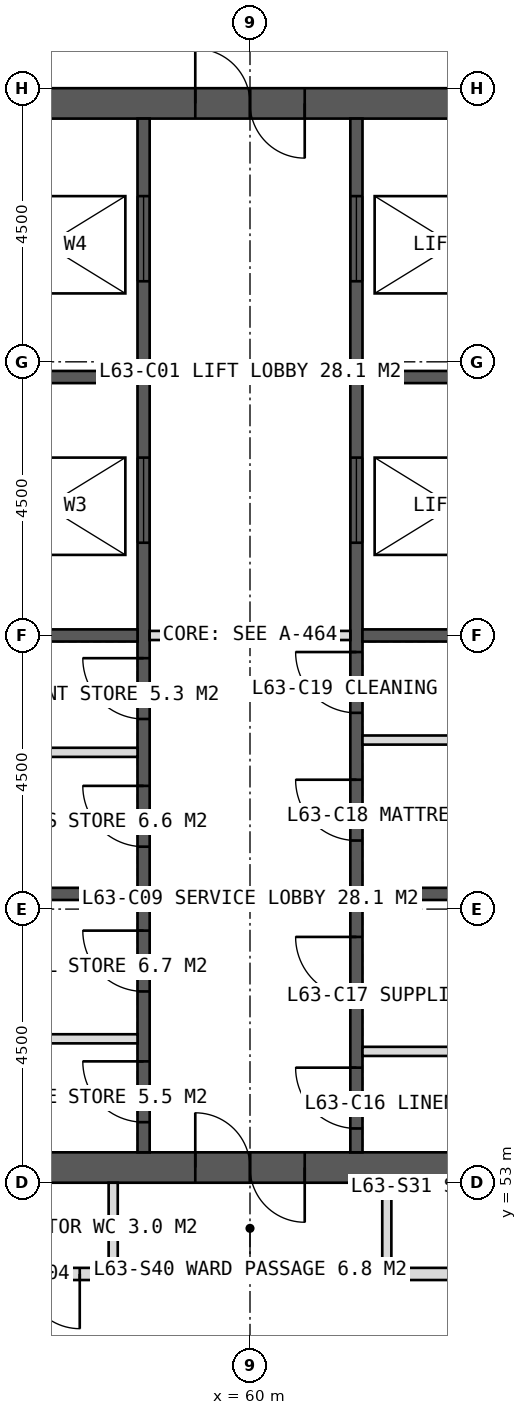
"""IFC4 building model, lengths in metres.
Left out: names, types, materials, properties, quantities, classifications, styles, units other than length and angle.
Written with IfcOpenShell. Run it as: python <this file> out.ifc"""

import sys

from ifc_helpers import new_model, si_unit, direction, frame, frame_2d, origin, place, context, subcontext, project, spatial, rectangle, extrude, element, fill, save


model = new_model("IFC4")
c1 = context("Model", 3, precision=1e-05, world=origin(), true_north=direction((0.0, 1.0)))
c2 = subcontext(c1, "Body", "Model", "MODEL_VIEW")
j1 = project(units=[si_unit("LENGTHUNIT", "METRE"), si_unit("PLANEANGLEUNIT", "RADIAN")], contexts=[c1])
p1 = place(None, origin())
s1 = spatial("IfcSite", under=j1, at=p1, CompositionType="ELEMENT")
p2 = place(p1, origin())
s2 = spatial("IfcBuilding", under=s1, at=p2, CompositionType="ELEMENT")
p3 = place(p2, frame((0.0, 0.0, 262.0)))
s3 = spatial("IfcBuildingStorey", under=s2, at=p3, CompositionType="ELEMENT", Elevation=262.0)
p4 = place(p3, frame((51.0, 70.75, 0.0), z_axis=(0.0, 0.0, 1.0), x_axis=(1.0, 0.0, 0.0)))
e1 = element("IfcWall", 1, at=p4, inside=s3, PredefinedType="SHEAR", context=c2, shape_type="SweptSolid", body=[
    extrude(rectangle(XDim=18.0, YDim=0.5, at=frame_2d((9.0, 0.0))), origin(), (0.0, 0.0, 1.0), 4.0),
])
p5 = place(p4, frame((8.1, 0.0, 0.0)))
e2 = element("IfcOpeningElement", 2, at=p5, cuts=e1, PredefinedType="OPENING", context=c2, shape_type="SweptSolid", body=[
    extrude(rectangle(XDim=1.8, YDim=2.2, at=frame_2d((0.9, 1.1))), frame((0.0, 0.26, 0.0), z_axis=(0.0, -1.0, 0.0), x_axis=(1.0, 0.0, 0.0)), (0.0, 0.0, 1.0), 0.52),
])
p6 = place(p3, frame((51.0, 53.25, 0.0), z_axis=(0.0, 0.0, 1.0), x_axis=(1.0, 0.0, 0.0)))
e3 = element("IfcWall", 3, at=p6, inside=s3, PredefinedType="SHEAR", context=c2, shape_type="SweptSolid", body=[
    extrude(rectangle(XDim=18.0, YDim=0.5, at=frame_2d((9.0, 0.0))), origin(), (0.0, 0.0, 1.0), 4.0),
])
p7 = place(p6, frame((8.1, 0.0, 0.0)))
e4 = element("IfcOpeningElement", 4, at=p7, cuts=e3, PredefinedType="OPENING", context=c2, shape_type="SweptSolid", body=[
    extrude(rectangle(XDim=1.8, YDim=2.2, at=frame_2d((0.9, 1.1))), frame((0.0, 0.26, 0.0), z_axis=(0.0, -1.0, 0.0), x_axis=(1.0, 0.0, 0.0)), (0.0, 0.0, 1.0), 0.52),
])
p8 = place(p3, frame((58.25, 53.5, 0.0), z_axis=(0.0, 0.0, 1.0), x_axis=(0.0, 1.0, 0.0)))
e5 = element("IfcWall", 5, at=p8, inside=s3, PredefinedType="SHEAR", context=c2, shape_type="SweptSolid", body=[
    extrude(rectangle(XDim=17.0, YDim=0.2, at=frame_2d((8.5, 0.0))), origin(), (0.0, 0.0, 1.0), 4.0),
])
p9 = place(p8, frame((0.496, 0.0, 0.0)))
e6 = element("IfcOpeningElement", 6, at=p9, cuts=e5, PredefinedType="OPENING", context=c2, shape_type="SweptSolid", body=[
    extrude(rectangle(XDim=1.0, YDim=2.1, at=frame_2d((0.5, 1.05))), frame((0.0, 0.11, 0.0), z_axis=(0.0, -1.0, 0.0), x_axis=(1.0, 0.0, 0.0)), (0.0, 0.0, 1.0), 0.22),
])
p10 = place(p8, frame((2.646, 0.0, 0.0)))
e7 = element("IfcOpeningElement", 7, at=p10, cuts=e5, PredefinedType="OPENING", context=c2, shape_type="SweptSolid", body=[
    extrude(rectangle(XDim=1.0, YDim=2.1, at=frame_2d((0.5, 1.05))), frame((0.0, 0.11, 0.0), z_axis=(0.0, -1.0, 0.0), x_axis=(1.0, 0.0, 0.0)), (0.0, 0.0, 1.0), 0.22),
])
p11 = place(p8, frame((5.027, 0.0, 0.0)))
e8 = element("IfcOpeningElement", 8, at=p11, cuts=e5, PredefinedType="OPENING", context=c2, shape_type="SweptSolid", body=[
    extrude(rectangle(XDim=1.0, YDim=2.1, at=frame_2d((0.5, 1.05))), frame((0.0, 0.11, 0.0), z_axis=(0.0, -1.0, 0.0), x_axis=(1.0, 0.0, 0.0)), (0.0, 0.0, 1.0), 0.22),
])
p12 = place(p8, frame((7.126, 0.0, 0.0)))
e9 = element("IfcOpeningElement", 9, at=p12, cuts=e5, PredefinedType="OPENING", context=c2, shape_type="SweptSolid", body=[
    extrude(rectangle(XDim=1.0, YDim=2.1, at=frame_2d((0.5, 1.05))), frame((0.0, 0.11, 0.0), z_axis=(0.0, -1.0, 0.0), x_axis=(1.0, 0.0, 0.0)), (0.0, 0.0, 1.0), 0.22),
])
p13 = place(p8, frame((10.025, 0.0, 0.0)))
e10 = element("IfcOpeningElement", 10, at=p13, cuts=e5, PredefinedType="OPENING", context=c2, shape_type="SweptSolid", body=[
    extrude(rectangle(XDim=1.4, YDim=2.2, at=frame_2d((0.7, 1.1))), frame((0.0, 0.11, 0.0), z_axis=(0.0, -1.0, 0.0), x_axis=(1.0, 0.0, 0.0)), (0.0, 0.0, 1.0), 0.22),
])
p14 = place(p8, frame((14.325, 0.0, 0.0)))
e11 = element("IfcOpeningElement", 11, at=p14, cuts=e5, PredefinedType="OPENING", context=c2, shape_type="SweptSolid", body=[
    extrude(rectangle(XDim=1.4, YDim=2.2, at=frame_2d((0.7, 1.1))), frame((0.0, 0.11, 0.0), z_axis=(0.0, -1.0, 0.0), x_axis=(1.0, 0.0, 0.0)), (0.0, 0.0, 1.0), 0.22),
])
p15 = place(p3, frame((61.75, 53.5, 0.0), z_axis=(0.0, 0.0, 1.0), x_axis=(0.0, 1.0, 0.0)))
e12 = element("IfcWall", 12, at=p15, inside=s3, PredefinedType="SHEAR", context=c2, shape_type="SweptSolid", body=[
    extrude(rectangle(XDim=17.0, YDim=0.2, at=frame_2d((8.5, 0.0))), origin(), (0.0, 0.0, 1.0), 4.0),
])
p16 = place(p15, frame((0.393, 0.0, 0.0)))
e13 = element("IfcOpeningElement", 13, at=p16, cuts=e12, PredefinedType="OPENING", context=c2, shape_type="SweptSolid", body=[
    extrude(rectangle(XDim=1.0, YDim=2.1, at=frame_2d((0.5, 1.05))), frame((0.0, 0.11, 0.0), z_axis=(0.0, -1.0, 0.0), x_axis=(1.0, 0.0, 0.0)), (0.0, 0.0, 1.0), 0.22),
])
p17 = place(p15, frame((2.542, 0.0, 0.0)))
e14 = element("IfcOpeningElement", 14, at=p17, cuts=e12, PredefinedType="OPENING", context=c2, shape_type="SweptSolid", body=[
    extrude(rectangle(XDim=1.0, YDim=2.1, at=frame_2d((0.5, 1.05))), frame((0.0, 0.11, 0.0), z_axis=(0.0, -1.0, 0.0), x_axis=(1.0, 0.0, 0.0)), (0.0, 0.0, 1.0), 0.22),
])
p18 = place(p15, frame((5.127, 0.0, 0.0)))
e15 = element("IfcOpeningElement", 15, at=p18, cuts=e12, PredefinedType="OPENING", context=c2, shape_type="SweptSolid", body=[
    extrude(rectangle(XDim=1.0, YDim=2.1, at=frame_2d((0.5, 1.05))), frame((0.0, 0.11, 0.0), z_axis=(0.0, -1.0, 0.0), x_axis=(1.0, 0.0, 0.0)), (0.0, 0.0, 1.0), 0.22),
])
p19 = place(p15, frame((7.228, 0.0, 0.0)))
e16 = element("IfcOpeningElement", 16, at=p19, cuts=e12, PredefinedType="OPENING", context=c2, shape_type="SweptSolid", body=[
    extrude(rectangle(XDim=1.0, YDim=2.1, at=frame_2d((0.5, 1.05))), frame((0.0, 0.11, 0.0), z_axis=(0.0, -1.0, 0.0), x_axis=(1.0, 0.0, 0.0)), (0.0, 0.0, 1.0), 0.22),
])
p20 = place(p15, frame((10.025, 0.0, 0.0)))
e17 = element("IfcOpeningElement", 17, at=p20, cuts=e12, PredefinedType="OPENING", context=c2, shape_type="SweptSolid", body=[
    extrude(rectangle(XDim=1.4, YDim=2.2, at=frame_2d((0.7, 1.1))), frame((0.0, 0.11, 0.0), z_axis=(0.0, -1.0, 0.0), x_axis=(1.0, 0.0, 0.0)), (0.0, 0.0, 1.0), 0.22),
])
p21 = place(p15, frame((14.325, 0.0, 0.0)))
e18 = element("IfcOpeningElement", 18, at=p21, cuts=e12, PredefinedType="OPENING", context=c2, shape_type="SweptSolid", body=[
    extrude(rectangle(XDim=1.4, YDim=2.2, at=frame_2d((0.7, 1.1))), frame((0.0, 0.11, 0.0), z_axis=(0.0, -1.0, 0.0), x_axis=(1.0, 0.0, 0.0)), (0.0, 0.0, 1.0), 0.22),
])
for number, where, z_axis, x_axis in (
    (19, (55.1, 57.75, 0.0), (0.0, 0.0, 1.0), (1.0, 0.0, 0.0)),
    (20, (61.85, 57.75, 0.0), (0.0, 0.0, 1.0), (1.0, 0.0, 0.0)),
    (21, (55.1, 62.0, 0.0), (0.0, 0.0, 1.0), (1.0, 0.0, 0.0)),
    (22, (61.85, 62.0, 0.0), (0.0, 0.0, 1.0), (1.0, 0.0, 0.0)),
    (23, (55.1, 66.25, 0.0), (0.0, 0.0, 1.0), (1.0, 0.0, 0.0)),
    (24, (61.85, 66.25, 0.0), (0.0, 0.0, 1.0), (1.0, 0.0, 0.0)),
):
    element("IfcWall", number, at=place(p3, frame(where, z_axis=z_axis, x_axis=x_axis)), inside=s3, PredefinedType="SHEAR", context=c2, shape_type="SweptSolid", body=[
        extrude(rectangle(XDim=3.05, YDim=0.2, at=frame_2d((1.525, 0.0))), origin(), (0.0, 0.0, 1.0), 4.0),
    ])
p22 = place(p3, frame((70.5, 51.5, 0.0), z_axis=(0.0, 0.0, 1.0), x_axis=(-1.0, 0.0, 0.0)))
e25 = element("IfcWall", 25, at=p22, inside=s3, PredefinedType="PARTITIONING", context=c2, shape_type="SweptSolid", body=[
    extrude(rectangle(XDim=8.25, YDim=0.2, at=frame_2d((4.125, 0.0))), origin(), (0.0, 0.0, 1.0), 3.75),
])
p23 = place(p22, frame((2.25, 0.0, 0.0)))
e26 = element("IfcOpeningElement", 26, at=p23, cuts=e25, PredefinedType="OPENING", context=c2, shape_type="SweptSolid", body=[
    extrude(rectangle(XDim=0.9, YDim=2.1, at=frame_2d((0.45, 1.05))), frame((0.0, 0.11, 0.0), z_axis=(0.0, -1.0, 0.0), x_axis=(1.0, 0.0, 0.0)), (0.0, 0.0, 1.0), 0.22),
])
p24 = place(p22, frame((5.575, 0.0, 0.0)))
e27 = element("IfcOpeningElement", 27, at=p24, cuts=e25, PredefinedType="OPENING", context=c2, shape_type="SweptSolid", body=[
    extrude(rectangle(XDim=1.0, YDim=2.1, at=frame_2d((0.5, 1.05))), frame((0.0, 0.11, 0.0), z_axis=(0.0, -1.0, 0.0), x_axis=(1.0, 0.0, 0.0)), (0.0, 0.0, 1.0), 0.22),
])
p25 = place(p3, frame((57.75, 51.5, 0.0), z_axis=(0.0, 0.0, 1.0), x_axis=(-1.0, 0.0, 0.0)))
e28 = element("IfcWall", 28, at=p25, inside=s3, PredefinedType="PARTITIONING", context=c2, shape_type="SweptSolid", body=[
    extrude(rectangle(XDim=8.25, YDim=0.2, at=frame_2d((4.125, 0.0))), origin(), (0.0, 0.0, 1.0), 3.75),
])
p26 = place(p25, frame((0.55, 0.0, 0.0)))
e29 = element("IfcOpeningElement", 29, at=p26, cuts=e28, PredefinedType="OPENING", context=c2, shape_type="SweptSolid", body=[
    extrude(rectangle(XDim=0.9, YDim=2.1, at=frame_2d((0.45, 1.05))), frame((0.0, 0.11, 0.0), z_axis=(0.0, -1.0, 0.0), x_axis=(1.0, 0.0, 0.0)), (0.0, 0.0, 1.0), 0.22),
])
p27 = place(p25, frame((4.625, 0.0, 0.0)))
e30 = element("IfcOpeningElement", 30, at=p27, cuts=e28, PredefinedType="OPENING", context=c2, shape_type="SweptSolid", body=[
    extrude(rectangle(XDim=1.0, YDim=2.1, at=frame_2d((0.5, 1.05))), frame((0.0, 0.11, 0.0), z_axis=(0.0, -1.0, 0.0), x_axis=(1.0, 0.0, 0.0)), (0.0, 0.0, 1.0), 0.22),
])
for number, where, z_axis, x_axis in (
    (31, (62.25, 53.0, 0.0), (0.0, 0.0, 1.0), (0.0, -1.0, 0.0)),
    (32, (57.75, 53.0, 0.0), (0.0, 0.0, 1.0), (0.0, -1.0, 0.0)),
):
    element("IfcWall", number, at=place(p3, frame(where, z_axis=z_axis, x_axis=x_axis)), inside=s3, PredefinedType="PARTITIONING", context=c2, shape_type="SweptSolid", body=[
        extrude(rectangle(XDim=1.5, YDim=0.15, at=frame_2d((0.75, 0.0))), origin(), (0.0, 0.0, 1.0), 3.75),
    ])
for number, where, z_axis, x_axis in (
    (33, (55.1, 55.367, 0.0), (0.0, 0.0, 1.0), (1.0, 0.0, 0.0)),
    (34, (61.85, 55.16, 0.0), (0.0, 0.0, 1.0), (1.0, 0.0, 0.0)),
    (35, (55.1, 60.078, 0.0), (0.0, 0.0, 1.0), (1.0, 0.0, 0.0)),
    (36, (61.85, 60.28, 0.0), (0.0, 0.0, 1.0), (1.0, 0.0, 0.0)),
):
    element("IfcWall", number, at=place(p3, frame(where, z_axis=z_axis, x_axis=x_axis)), inside=s3, PredefinedType="PARTITIONING", context=c2, shape_type="SweptSolid", body=[
        extrude(rectangle(XDim=3.05, YDim=0.15, at=frame_2d((1.525, 0.0))), origin(), (0.0, 0.0, 1.0), 3.75),
    ])
p28 = place(p3, frame((58.35, 62.0, 0.0), z_axis=(0.0, 0.0, 1.0), x_axis=(1.0, 0.0, 0.0)))
e37 = element("IfcWall", 37, at=p28, inside=s3, PredefinedType="PARTITIONING", context=c2, shape_type="SweptSolid", body=[
    extrude(rectangle(XDim=3.3, YDim=0.15, at=frame_2d((1.65, 0.0))), origin(), (0.0, 0.0, 1.0), 3.75),
])
p29 = place(p26, origin())
e38 = element("IfcDoor", 38, at=p29, inside=s3, OperationType="SINGLE_SWING_LEFT", PredefinedType="DOOR", context=c2, shape_type="SweptSolid", body=[
    extrude(rectangle(XDim=0.9, YDim=2.1, at=frame_2d((0.45, 1.05))), frame((0.0, 0.025, 0.0), z_axis=(0.0, -1.0, 0.0), x_axis=(1.0, 0.0, 0.0)), (0.0, 0.0, 1.0), 0.05),
])
fill(e29, e38)
p30 = place(p5, origin())
e39 = element("IfcDoor", 39, at=p30, inside=s3, OperationType="DOUBLE_DOOR_SINGLE_SWING", PredefinedType="DOOR", context=c2, shape_type="SweptSolid", body=[
    extrude(rectangle(XDim=1.8, YDim=2.2, at=frame_2d((0.9, 1.1))), frame((0.0, 0.025, 0.0), z_axis=(0.0, -1.0, 0.0), x_axis=(1.0, 0.0, 0.0)), (0.0, 0.0, 1.0), 0.05),
])
fill(e2, e39)
p31 = place(p9, origin())
e40 = element("IfcDoor", 40, at=p31, inside=s3, OperationType="SINGLE_SWING_RIGHT", PredefinedType="DOOR", context=c2, shape_type="SweptSolid", body=[
    extrude(rectangle(XDim=1.0, YDim=2.1, at=frame_2d((0.5, 1.05))), frame((0.0, 0.025, 0.0), z_axis=(0.0, -1.0, 0.0), x_axis=(1.0, 0.0, 0.0)), (0.0, 0.0, 1.0), 0.05),
])
fill(e6, e40)
p32 = place(p10, origin())
e41 = element("IfcDoor", 41, at=p32, inside=s3, OperationType="SINGLE_SWING_RIGHT", PredefinedType="DOOR", context=c2, shape_type="SweptSolid", body=[
    extrude(rectangle(XDim=1.0, YDim=2.1, at=frame_2d((0.5, 1.05))), frame((0.0, 0.025, 0.0), z_axis=(0.0, -1.0, 0.0), x_axis=(1.0, 0.0, 0.0)), (0.0, 0.0, 1.0), 0.05),
])
fill(e7, e41)
p33 = place(p16, origin())
e42 = element("IfcDoor", 42, at=p33, inside=s3, OperationType="SINGLE_SWING_RIGHT", PredefinedType="DOOR", context=c2, shape_type="SweptSolid", body=[
    extrude(rectangle(XDim=1.0, YDim=2.1, at=frame_2d((0.5, 1.05))), frame((0.0, 0.025, 0.0), z_axis=(0.0, -1.0, 0.0), x_axis=(1.0, 0.0, 0.0)), (0.0, 0.0, 1.0), 0.05),
])
fill(e13, e42)
p34 = place(p17, origin())
e43 = element("IfcDoor", 43, at=p34, inside=s3, OperationType="SINGLE_SWING_RIGHT", PredefinedType="DOOR", context=c2, shape_type="SweptSolid", body=[
    extrude(rectangle(XDim=1.0, YDim=2.1, at=frame_2d((0.5, 1.05))), frame((0.0, 0.025, 0.0), z_axis=(0.0, -1.0, 0.0), x_axis=(1.0, 0.0, 0.0)), (0.0, 0.0, 1.0), 0.05),
])
fill(e14, e43)
p35 = place(p11, origin())
e44 = element("IfcDoor", 44, at=p35, inside=s3, OperationType="SINGLE_SWING_RIGHT", PredefinedType="DOOR", context=c2, shape_type="SweptSolid", body=[
    extrude(rectangle(XDim=1.0, YDim=2.1, at=frame_2d((0.5, 1.05))), frame((0.0, 0.025, 0.0), z_axis=(0.0, -1.0, 0.0), x_axis=(1.0, 0.0, 0.0)), (0.0, 0.0, 1.0), 0.05),
])
fill(e8, e44)
p36 = place(p12, origin())
e45 = element("IfcDoor", 45, at=p36, inside=s3, OperationType="SINGLE_SWING_RIGHT", PredefinedType="DOOR", context=c2, shape_type="SweptSolid", body=[
    extrude(rectangle(XDim=1.0, YDim=2.1, at=frame_2d((0.5, 1.05))), frame((0.0, 0.025, 0.0), z_axis=(0.0, -1.0, 0.0), x_axis=(1.0, 0.0, 0.0)), (0.0, 0.0, 1.0), 0.05),
])
fill(e9, e45)
p37 = place(p18, origin())
e46 = element("IfcDoor", 46, at=p37, inside=s3, OperationType="SINGLE_SWING_RIGHT", PredefinedType="DOOR", context=c2, shape_type="SweptSolid", body=[
    extrude(rectangle(XDim=1.0, YDim=2.1, at=frame_2d((0.5, 1.05))), frame((0.0, 0.025, 0.0), z_axis=(0.0, -1.0, 0.0), x_axis=(1.0, 0.0, 0.0)), (0.0, 0.0, 1.0), 0.05),
])
fill(e15, e46)
p38 = place(p19, origin())
e47 = element("IfcDoor", 47, at=p38, inside=s3, OperationType="SINGLE_SWING_RIGHT", PredefinedType="DOOR", context=c2, shape_type="SweptSolid", body=[
    extrude(rectangle(XDim=1.0, YDim=2.1, at=frame_2d((0.5, 1.05))), frame((0.0, 0.025, 0.0), z_axis=(0.0, -1.0, 0.0), x_axis=(1.0, 0.0, 0.0)), (0.0, 0.0, 1.0), 0.05),
])
fill(e16, e47)
p39 = place(p13, origin())
e48 = element("IfcDoor", 48, at=p39, inside=s3, OperationType="SLIDING_TO_LEFT", PredefinedType="DOOR", context=c2, shape_type="SweptSolid", body=[
    extrude(rectangle(XDim=1.4, YDim=2.2, at=frame_2d((0.7, 1.1))), frame((0.0, 0.025, 0.0), z_axis=(0.0, -1.0, 0.0), x_axis=(1.0, 0.0, 0.0)), (0.0, 0.0, 1.0), 0.05),
])
fill(e10, e48)
p40 = place(p20, origin())
e49 = element("IfcDoor", 49, at=p40, inside=s3, OperationType="SLIDING_TO_LEFT", PredefinedType="DOOR", context=c2, shape_type="SweptSolid", body=[
    extrude(rectangle(XDim=1.4, YDim=2.2, at=frame_2d((0.7, 1.1))), frame((0.0, 0.025, 0.0), z_axis=(0.0, -1.0, 0.0), x_axis=(1.0, 0.0, 0.0)), (0.0, 0.0, 1.0), 0.05),
])
fill(e17, e49)
p41 = place(p14, origin())
e50 = element("IfcDoor", 50, at=p41, inside=s3, OperationType="SLIDING_TO_LEFT", PredefinedType="DOOR", context=c2, shape_type="SweptSolid", body=[
    extrude(rectangle(XDim=1.4, YDim=2.2, at=frame_2d((0.7, 1.1))), frame((0.0, 0.025, 0.0), z_axis=(0.0, -1.0, 0.0), x_axis=(1.0, 0.0, 0.0)), (0.0, 0.0, 1.0), 0.05),
])
fill(e11, e50)
p42 = place(p21, origin())
e51 = element("IfcDoor", 51, at=p42, inside=s3, OperationType="SLIDING_TO_LEFT", PredefinedType="DOOR", context=c2, shape_type="SweptSolid", body=[
    extrude(rectangle(XDim=1.4, YDim=2.2, at=frame_2d((0.7, 1.1))), frame((0.0, 0.025, 0.0), z_axis=(0.0, -1.0, 0.0), x_axis=(1.0, 0.0, 0.0)), (0.0, 0.0, 1.0), 0.05),
])
fill(e18, e51)
p43 = place(p7, origin())
e52 = element("IfcDoor", 52, at=p43, inside=s3, OperationType="DOUBLE_DOOR_SINGLE_SWING", PredefinedType="DOOR", context=c2, shape_type="SweptSolid", body=[
    extrude(rectangle(XDim=1.8, YDim=2.2, at=frame_2d((0.9, 1.1))), frame((0.0, 0.025, 0.0), z_axis=(0.0, -1.0, 0.0), x_axis=(1.0, 0.0, 0.0)), (0.0, 0.0, 1.0), 0.05),
])
fill(e4, e52)
save(model, sys.argv[1])
